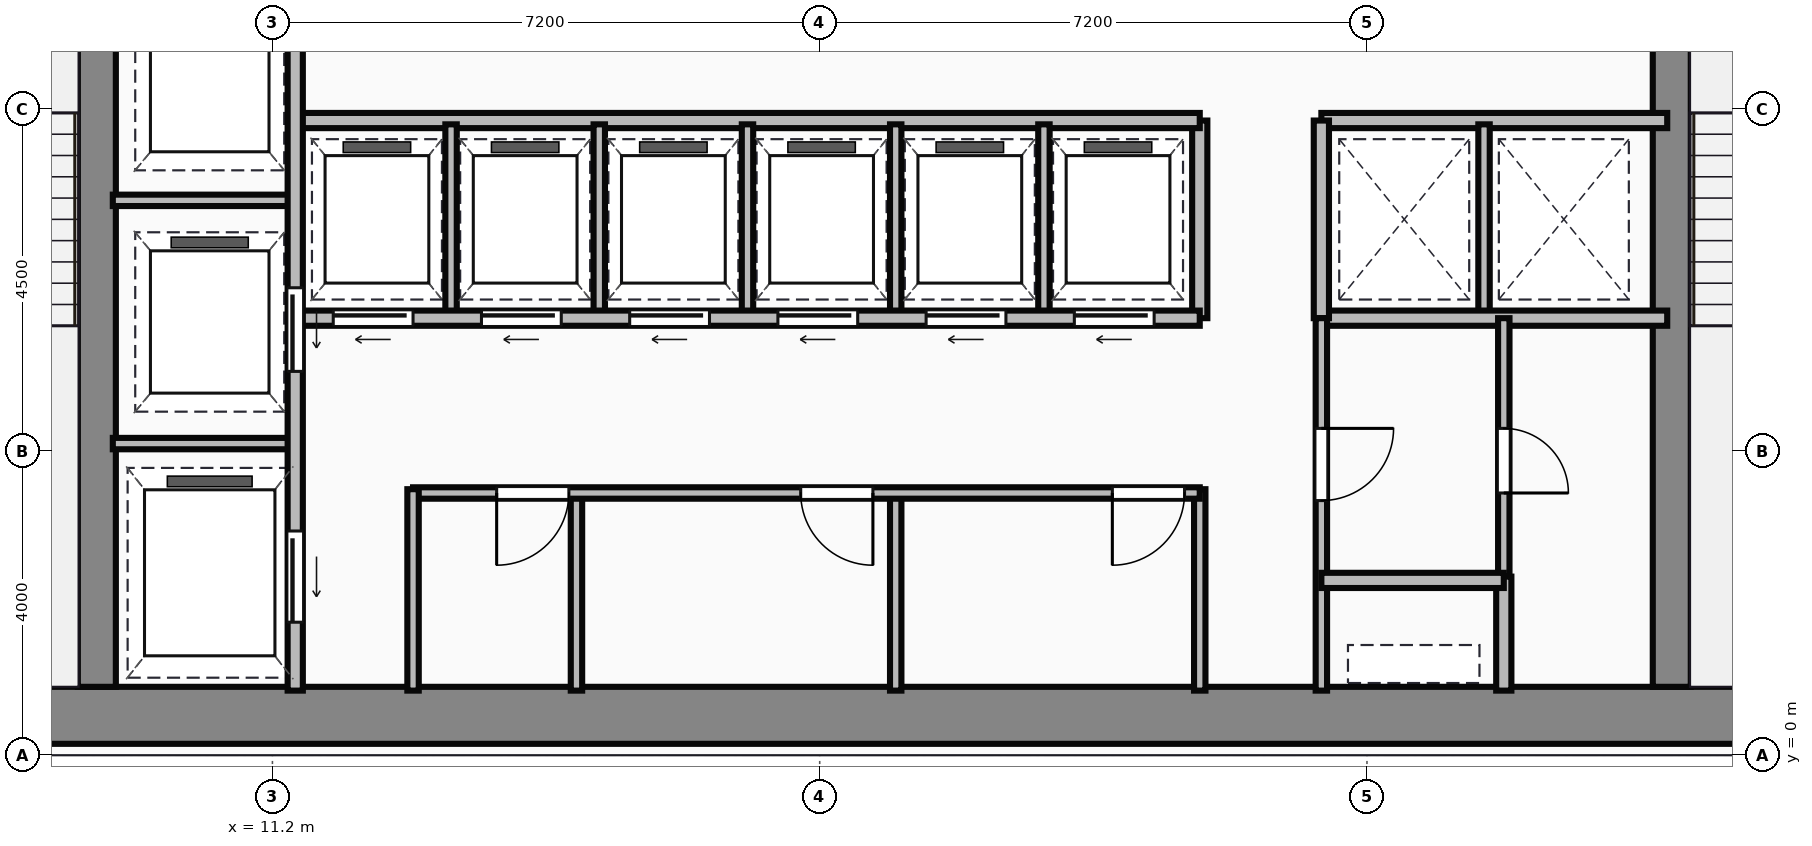
"""IFC4 building model, lengths in metres.
Left out: names, types, materials, properties, quantities, classifications, styles, units other than length and angle.
Written with IfcOpenShell. Run it as: python <this file> out.ifc"""

import sys

from ifc_helpers import new_model, si_unit, direction, frame, frame_2d, origin, place, context, subcontext, project, spatial, rectangle, extrude, source, transform, mapped, element, fill, save


model = new_model("IFC4")
c1 = context("Model", 3, precision=1e-05, world=origin(), true_north=direction((0.0, 1.0)))
c2 = subcontext(c1, "Body", "Model", "MODEL_VIEW")
j1 = project(units=[si_unit("LENGTHUNIT", "METRE"), si_unit("PLANEANGLEUNIT", "RADIAN")], contexts=[c1])
p1 = place(None, origin())
s1 = spatial("IfcSite", under=j1, at=p1, CompositionType="ELEMENT")
p2 = place(p1, origin())
s2 = spatial("IfcBuilding", under=s1, at=p2, CompositionType="ELEMENT")
p3 = place(p2, frame((0.0, 0.0, 114.2)))
s3 = spatial("IfcBuildingStorey", under=s2, at=p3, CompositionType="ELEMENT", Elevation=114.2)
m1 = source(origin(), c2, "Body", "SweptSolid", [
    extrude(rectangle(XDim=29.5, YDim=0.75, at=frame_2d((14.75, 0.0))), origin(), (0.0, 0.0, 1.0), 3.65),
])
p4 = place(p3, frame((4.5, 0.525, 0.0), z_axis=(0.0, 0.0, 1.0), x_axis=(1.0, 0.0, 0.0)))
e1 = element("IfcWall", 1, at=p4, inside=s3, PredefinedType="SHEAR", context=c2, shape_type="MappedRepresentation", body=[
    mapped(m1, transform((0.0, 0.0, 0.0))),
])
m2 = source(origin(), c2, "Body", "SweptSolid", [
    extrude(rectangle(XDim=12.35, YDim=0.5, at=frame_2d((6.175, 0.0))), origin(), (0.0, 0.0, 1.0), 3.65),
])
for number, where, z_axis, x_axis in (
    (2, (8.89, 0.9, 0.0), (0.0, 0.0, 1.0), (0.0, 1.0, 0.0)),
    (3, (29.61, 0.9, 0.0), (0.0, 0.0, 1.0), (0.0, 1.0, 0.0)),
):
    element("IfcWall", number, at=place(p3, frame(where, z_axis=z_axis, x_axis=x_axis)), inside=s3, PredefinedType="SHEAR", context=c2, shape_type="MappedRepresentation", body=[
        mapped(m2, transform((0.0, 0.0, 0.0))),
    ])
m3 = source(origin(), c2, "Body", "SweptSolid", [
    extrude(rectangle(XDim=9.6, YDim=0.2, at=frame_2d((4.8, 0.0))), origin(), (0.0, 0.0, 1.0), 3.4),
])
p5 = place(p3, frame((11.5, 0.85, 0.0), z_axis=(0.0, 0.0, 1.0), x_axis=(0.0, 1.0, 0.0)))
e4 = element("IfcWall", 4, at=p5, inside=s3, PredefinedType="PARTITIONING", context=c2, shape_type="MappedRepresentation", body=[
    mapped(m3, transform((0.0, 0.0, 0.0))),
])
p6 = place(p5, frame((4.2, 0.0, 0.0)))
e5 = element("IfcOpeningElement", 5, at=p6, cuts=e4, PredefinedType="OPENING", context=c2, shape_type="SweptSolid", body=[
    extrude(rectangle(XDim=1.1, YDim=2.15, at=frame_2d((0.55, 1.075))), frame((0.0, 0.11, 0.0), z_axis=(0.0, -1.0, 0.0), x_axis=(1.0, 0.0, 0.0)), (0.0, 0.0, 1.0), 0.22),
])
p7 = place(p5, frame((0.9, 0.0, 0.0)))
e6 = element("IfcOpeningElement", 6, at=p7, cuts=e4, PredefinedType="OPENING", context=c2, shape_type="SweptSolid", body=[
    extrude(rectangle(XDim=1.2, YDim=2.15, at=frame_2d((0.6, 1.075))), frame((0.0, 0.11, 0.0), z_axis=(0.0, -1.0, 0.0), x_axis=(1.0, 0.0, 0.0)), (0.0, 0.0, 1.0), 0.22),
])
m4 = source(origin(), c2, "Body", "SweptSolid", [
    extrude(rectangle(XDim=2.4, YDim=0.15, at=frame_2d((1.2, 0.0))), origin(), (0.0, 0.0, 1.0), 3.4),
])
for number, where, z_axis, x_axis in (
    (7, (9.1, 4.1, 0.0), (0.0, 0.0, 1.0), (1.0, 0.0, 0.0)),
    (8, (9.1, 7.3, 0.0), (0.0, 0.0, 1.0), (1.0, 0.0, 0.0)),
):
    element("IfcWall", number, at=place(p3, frame(where, z_axis=z_axis, x_axis=x_axis)), inside=s3, PredefinedType="PARTITIONING", context=c2, shape_type="MappedRepresentation", body=[
        mapped(m4, transform((0.0, 0.0, 0.0))),
    ])
m5 = source(origin(), c2, "Body", "SweptSolid", [
    extrude(rectangle(XDim=2.65, YDim=0.15, at=frame_2d((1.325, 0.0))), origin(), (0.0, 0.0, 1.0), 3.4),
])
p8 = place(p3, frame((13.05, 0.85, 0.0), z_axis=(0.0, 0.0, 1.0), x_axis=(0.0, 1.0, 0.0)))
e9 = element("IfcWall", 9, at=p8, inside=s3, PredefinedType="PARTITIONING", context=c2, shape_type="MappedRepresentation", body=[
    mapped(m5, transform((0.0, 0.0, 0.0))),
])
m6 = source(origin(), c2, "Body", "SweptSolid", [
    extrude(rectangle(XDim=10.35, YDim=0.15, at=frame_2d((5.175, 0.0))), origin(), (0.0, 0.0, 1.0), 3.4),
])
p9 = place(p3, frame((13.05, 3.45, 0.0), z_axis=(0.0, 0.0, 1.0), x_axis=(1.0, 0.0, 0.0)))
e10 = element("IfcWall", 10, at=p9, inside=s3, PredefinedType="PARTITIONING", context=c2, shape_type="MappedRepresentation", body=[
    mapped(m6, transform((0.0, 0.0, 0.0))),
])
p10 = place(p9, frame((1.1, 0.0, 0.0)))
e11 = element("IfcOpeningElement", 11, at=p10, cuts=e10, PredefinedType="OPENING", context=c2, shape_type="SweptSolid", body=[
    extrude(rectangle(XDim=0.95, YDim=2.15, at=frame_2d((0.475, 1.075))), frame((0.0, 0.085, 0.0), z_axis=(0.0, -1.0, 0.0), x_axis=(1.0, 0.0, 0.0)), (0.0, 0.0, 1.0), 0.17),
])
p11 = place(p9, frame((5.1, 0.0, 0.0)))
e12 = element("IfcOpeningElement", 12, at=p11, cuts=e10, PredefinedType="OPENING", context=c2, shape_type="SweptSolid", body=[
    extrude(rectangle(XDim=0.95, YDim=2.15, at=frame_2d((0.475, 1.075))), frame((0.0, 0.085, 0.0), z_axis=(0.0, -1.0, 0.0), x_axis=(1.0, 0.0, 0.0)), (0.0, 0.0, 1.0), 0.17),
])
p12 = place(p9, frame((9.2, 0.0, 0.0)))
e13 = element("IfcOpeningElement", 13, at=p12, cuts=e10, PredefinedType="OPENING", context=c2, shape_type="SweptSolid", body=[
    extrude(rectangle(XDim=0.95, YDim=2.15, at=frame_2d((0.475, 1.075))), frame((0.0, 0.085, 0.0), z_axis=(0.0, -1.0, 0.0), x_axis=(1.0, 0.0, 0.0)), (0.0, 0.0, 1.0), 0.17),
])
p13 = place(p3, frame((23.4, 0.85, 0.0), z_axis=(0.0, 0.0, 1.0), x_axis=(0.0, 1.0, 0.0)))
e14 = element("IfcWall", 14, at=p13, inside=s3, PredefinedType="PARTITIONING", context=c2, shape_type="MappedRepresentation", body=[
    mapped(m5, transform((0.0, 0.0, 0.0))),
])
m7 = source(origin(), c2, "Body", "SweptSolid", [
    extrude(rectangle(XDim=2.6, YDim=0.15, at=frame_2d((1.3, 0.0))), origin(), (0.0, 0.0, 1.0), 3.4),
])
for number, where, z_axis, x_axis in (
    (15, (15.2, 0.85, 0.0), (0.0, 0.0, 1.0), (0.0, 1.0, 0.0)),
    (16, (19.4, 0.85, 0.0), (0.0, 0.0, 1.0), (0.0, 1.0, 0.0)),
):
    element("IfcWall", number, at=place(p3, frame(where, z_axis=z_axis, x_axis=x_axis)), inside=s3, PredefinedType="PARTITIONING", context=c2, shape_type="MappedRepresentation", body=[
        mapped(m7, transform((0.0, 0.0, 0.0))),
    ])
m8 = source(origin(), c2, "Body", "SweptSolid", [
    extrude(rectangle(XDim=11.85, YDim=0.2, at=frame_2d((5.925, 0.0))), origin(), (0.0, 0.0, 1.0), 3.4),
])
p14 = place(p3, frame((11.55, 5.75, 0.0), z_axis=(0.0, 0.0, 1.0), x_axis=(1.0, 0.0, 0.0)))
e17 = element("IfcWall", 17, at=p14, inside=s3, PredefinedType="PARTITIONING", context=c2, shape_type="MappedRepresentation", body=[
    mapped(m8, transform((0.0, 0.0, 0.0))),
])
p15 = place(p14, frame((0.45, 0.0, 0.0)))
e18 = element("IfcOpeningElement", 18, at=p15, cuts=e17, PredefinedType="OPENING", context=c2, shape_type="SweptSolid", body=[
    extrude(rectangle(XDim=1.05, YDim=2.15, at=frame_2d((0.525, 1.075))), frame((0.0, 0.11, 0.0), z_axis=(0.0, -1.0, 0.0), x_axis=(1.0, 0.0, 0.0)), (0.0, 0.0, 1.0), 0.22),
])
p16 = place(p14, frame((2.4, 0.0, 0.0)))
e19 = element("IfcOpeningElement", 19, at=p16, cuts=e17, PredefinedType="OPENING", context=c2, shape_type="SweptSolid", body=[
    extrude(rectangle(XDim=1.05, YDim=2.15, at=frame_2d((0.525, 1.075))), frame((0.0, 0.11, 0.0), z_axis=(0.0, -1.0, 0.0), x_axis=(1.0, 0.0, 0.0)), (0.0, 0.0, 1.0), 0.22),
])
p17 = place(p14, frame((4.35, 0.0, 0.0)))
e20 = element("IfcOpeningElement", 20, at=p17, cuts=e17, PredefinedType="OPENING", context=c2, shape_type="SweptSolid", body=[
    extrude(rectangle(XDim=1.05, YDim=2.15, at=frame_2d((0.525, 1.075))), frame((0.0, 0.11, 0.0), z_axis=(0.0, -1.0, 0.0), x_axis=(1.0, 0.0, 0.0)), (0.0, 0.0, 1.0), 0.22),
])
p18 = place(p14, frame((6.3, 0.0, 0.0)))
e21 = element("IfcOpeningElement", 21, at=p18, cuts=e17, PredefinedType="OPENING", context=c2, shape_type="SweptSolid", body=[
    extrude(rectangle(XDim=1.05, YDim=2.15, at=frame_2d((0.525, 1.075))), frame((0.0, 0.11, 0.0), z_axis=(0.0, -1.0, 0.0), x_axis=(1.0, 0.0, 0.0)), (0.0, 0.0, 1.0), 0.22),
])
p19 = place(p14, frame((8.25, 0.0, 0.0)))
e22 = element("IfcOpeningElement", 22, at=p19, cuts=e17, PredefinedType="OPENING", context=c2, shape_type="SweptSolid", body=[
    extrude(rectangle(XDim=1.05, YDim=2.15, at=frame_2d((0.525, 1.075))), frame((0.0, 0.11, 0.0), z_axis=(0.0, -1.0, 0.0), x_axis=(1.0, 0.0, 0.0)), (0.0, 0.0, 1.0), 0.22),
])
p20 = place(p14, frame((10.2, 0.0, 0.0)))
e23 = element("IfcOpeningElement", 23, at=p20, cuts=e17, PredefinedType="OPENING", context=c2, shape_type="SweptSolid", body=[
    extrude(rectangle(XDim=1.05, YDim=2.15, at=frame_2d((0.525, 1.075))), frame((0.0, 0.11, 0.0), z_axis=(0.0, -1.0, 0.0), x_axis=(1.0, 0.0, 0.0)), (0.0, 0.0, 1.0), 0.22),
])
p21 = place(p3, frame((11.55, 8.35, 0.0), z_axis=(0.0, 0.0, 1.0), x_axis=(1.0, 0.0, 0.0)))
e24 = element("IfcWall", 24, at=p21, inside=s3, PredefinedType="PARTITIONING", context=c2, shape_type="MappedRepresentation", body=[
    mapped(m8, transform((0.0, 0.0, 0.0))),
])
m9 = source(origin(), c2, "Body", "SweptSolid", [
    extrude(rectangle(XDim=2.6, YDim=0.2, at=frame_2d((1.3, 0.0))), origin(), (0.0, 0.0, 1.0), 3.4),
])
p22 = place(p3, frame((23.4, 5.75, 0.0), z_axis=(0.0, 0.0, 1.0), x_axis=(0.0, 1.0, 0.0)))
e25 = element("IfcWall", 25, at=p22, inside=s3, PredefinedType="PARTITIONING", context=c2, shape_type="MappedRepresentation", body=[
    mapped(m9, transform((0.0, 0.0, 0.0))),
])
m10 = source(origin(), c2, "Body", "SweptSolid", [
    extrude(rectangle(XDim=2.5, YDim=0.15, at=frame_2d((1.25, 0.0))), origin(), (0.0, 0.0, 1.0), 3.4),
])
for number, where, z_axis, x_axis in (
    (26, (13.55, 5.8, 0.0), (0.0, 0.0, 1.0), (0.0, 1.0, 0.0)),
    (27, (15.5, 5.8, 0.0), (0.0, 0.0, 1.0), (0.0, 1.0, 0.0)),
    (28, (17.45, 5.8, 0.0), (0.0, 0.0, 1.0), (0.0, 1.0, 0.0)),
    (29, (19.4, 5.8, 0.0), (0.0, 0.0, 1.0), (0.0, 1.0, 0.0)),
    (30, (21.35, 5.8, 0.0), (0.0, 0.0, 1.0), (0.0, 1.0, 0.0)),
):
    element("IfcWall", number, at=place(p3, frame(where, z_axis=z_axis, x_axis=x_axis)), inside=s3, PredefinedType="PARTITIONING", context=c2, shape_type="MappedRepresentation", body=[
        mapped(m10, transform((0.0, 0.0, 0.0))),
    ])
m11 = source(origin(), c2, "Body", "SweptSolid", [
    extrude(rectangle(XDim=4.55, YDim=0.2, at=frame_2d((2.275, 0.0))), origin(), (0.0, 0.0, 1.0), 3.4),
])
for number, where, z_axis, x_axis in (
    (31, (25.0, 8.35, 0.0), (0.0, 0.0, 1.0), (1.0, 0.0, 0.0)),
    (32, (25.0, 5.75, 0.0), (0.0, 0.0, 1.0), (1.0, 0.0, 0.0)),
):
    element("IfcWall", number, at=place(p3, frame(where, z_axis=z_axis, x_axis=x_axis)), inside=s3, PredefinedType="PARTITIONING", context=c2, shape_type="MappedRepresentation", body=[
        mapped(m11, transform((0.0, 0.0, 0.0))),
    ])
p23 = place(p3, frame((25.0, 5.75, 0.0), z_axis=(0.0, 0.0, 1.0), x_axis=(0.0, 1.0, 0.0)))
e33 = element("IfcWall", 33, at=p23, inside=s3, PredefinedType="PARTITIONING", context=c2, shape_type="MappedRepresentation", body=[
    mapped(m9, transform((0.0, 0.0, 0.0))),
])
p24 = place(p3, frame((27.14, 5.8, 0.0), z_axis=(0.0, 0.0, 1.0), x_axis=(0.0, 1.0, 0.0)))
e34 = element("IfcWall", 34, at=p24, inside=s3, PredefinedType="PARTITIONING", context=c2, shape_type="MappedRepresentation", body=[
    mapped(m10, transform((0.0, 0.0, 0.0))),
])
m12 = source(origin(), c2, "Body", "SweptSolid", [
    extrude(rectangle(XDim=4.9, YDim=0.15, at=frame_2d((2.45, 0.0))), origin(), (0.0, 0.0, 1.0), 3.4),
])
p25 = place(p3, frame((25.0, 0.85, 0.0), z_axis=(0.0, 0.0, 1.0), x_axis=(0.0, 1.0, 0.0)))
e35 = element("IfcWall", 35, at=p25, inside=s3, PredefinedType="PARTITIONING", context=c2, shape_type="MappedRepresentation", body=[
    mapped(m12, transform((0.0, 0.0, 0.0))),
])
p26 = place(p25, frame((2.5, 0.0, 0.0)))
e36 = element("IfcOpeningElement", 36, at=p26, cuts=e35, PredefinedType="OPENING", context=c2, shape_type="SweptSolid", body=[
    extrude(rectangle(XDim=0.95, YDim=2.15, at=frame_2d((0.475, 1.075))), frame((0.0, 0.085, 0.0), z_axis=(0.0, -1.0, 0.0), x_axis=(1.0, 0.0, 0.0)), (0.0, 0.0, 1.0), 0.17),
])
m13 = source(origin(), c2, "Body", "SweptSolid", [
    extrude(rectangle(XDim=2.4, YDim=0.2, at=frame_2d((1.2, 0.0))), origin(), (0.0, 0.0, 1.0), 3.4),
])
p27 = place(p3, frame((25.0, 2.3, 0.0), z_axis=(0.0, 0.0, 1.0), x_axis=(1.0, 0.0, 0.0)))
e37 = element("IfcWall", 37, at=p27, inside=s3, PredefinedType="PARTITIONING", context=c2, shape_type="MappedRepresentation", body=[
    mapped(m13, transform((0.0, 0.0, 0.0))),
])
m14 = source(origin(), c2, "Body", "SweptSolid", [
    extrude(rectangle(XDim=1.5, YDim=0.2, at=frame_2d((0.75, 0.0))), origin(), (0.0, 0.0, 1.0), 3.4),
])
p28 = place(p3, frame((27.4, 0.85, 0.0), z_axis=(0.0, 0.0, 1.0), x_axis=(0.0, 1.0, 0.0)))
e38 = element("IfcWall", 38, at=p28, inside=s3, PredefinedType="PARTITIONING", context=c2, shape_type="MappedRepresentation", body=[
    mapped(m14, transform((0.0, 0.0, 0.0))),
])
m15 = source(origin(), c2, "Body", "SweptSolid", [
    extrude(rectangle(XDim=3.4, YDim=0.15, at=frame_2d((1.7, 0.0))), origin(), (0.0, 0.0, 1.0), 3.4),
])
p29 = place(p3, frame((27.4, 2.35, 0.0), z_axis=(0.0, 0.0, 1.0), x_axis=(0.0, 1.0, 0.0)))
e39 = element("IfcWall", 39, at=p29, inside=s3, PredefinedType="PARTITIONING", context=c2, shape_type="MappedRepresentation", body=[
    mapped(m15, transform((0.0, 0.0, 0.0))),
])
p30 = place(p29, frame((1.1, 0.0, 0.0)))
e40 = element("IfcOpeningElement", 40, at=p30, cuts=e39, PredefinedType="OPENING", context=c2, shape_type="SweptSolid", body=[
    extrude(rectangle(XDim=0.85, YDim=2.1, at=frame_2d((0.425, 1.05))), frame((0.0, 0.085, 0.0), z_axis=(0.0, -1.0, 0.0), x_axis=(1.0, 0.0, 0.0)), (0.0, 0.0, 1.0), 0.17),
])
m16 = source(origin(), c2, "Body", "SweptSolid", [
    extrude(rectangle(XDim=1.1, YDim=2.15, at=frame_2d((0.55, 1.075))), frame((0.0, 0.025, 0.0), z_axis=(0.0, -1.0, 0.0), x_axis=(1.0, 0.0, 0.0)), (0.0, 0.0, 1.0), 0.05),
])
p31 = place(p6, frame((1.1, 0.0, 0.0), z_axis=(0.0, 0.0, 1.0), x_axis=(-1.0, 0.0, 0.0)))
e41 = element("IfcDoor", 41, at=p31, inside=s3, OperationType="SLIDING_TO_LEFT", PredefinedType="DOOR", context=c2, shape_type="MappedRepresentation", body=[
    mapped(m16, transform((0.0, 0.0, 0.0))),
])
fill(e5, e41)
m17 = source(origin(), c2, "Body", "SweptSolid", [
    extrude(rectangle(XDim=1.2, YDim=2.15, at=frame_2d((0.6, 1.075))), frame((0.0, 0.025, 0.0), z_axis=(0.0, -1.0, 0.0), x_axis=(1.0, 0.0, 0.0)), (0.0, 0.0, 1.0), 0.05),
])
p32 = place(p7, frame((1.2, 0.0, 0.0), z_axis=(0.0, 0.0, 1.0), x_axis=(-1.0, 0.0, 0.0)))
e42 = element("IfcDoor", 42, at=p32, inside=s3, OperationType="SLIDING_TO_LEFT", PredefinedType="DOOR", context=c2, shape_type="MappedRepresentation", body=[
    mapped(m17, transform((0.0, 0.0, 0.0))),
])
fill(e6, e42)
m18 = source(origin(), c2, "Body", "SweptSolid", [
    extrude(rectangle(XDim=0.95, YDim=2.15, at=frame_2d((0.475, 1.075))), frame((0.0, 0.025, 0.0), z_axis=(0.0, -1.0, 0.0), x_axis=(1.0, 0.0, 0.0)), (0.0, 0.0, 1.0), 0.05),
])
p33 = place(p10, origin())
e43 = element("IfcDoor", 43, at=p33, inside=s3, OperationType="SINGLE_SWING_LEFT", PredefinedType="DOOR", context=c2, shape_type="MappedRepresentation", body=[
    mapped(m18, transform((0.0, 0.0, 0.0))),
])
fill(e11, e43)
p34 = place(p11, origin())
e44 = element("IfcDoor", 44, at=p34, inside=s3, OperationType="SINGLE_SWING_RIGHT", PredefinedType="DOOR", context=c2, shape_type="MappedRepresentation", body=[
    mapped(m18, transform((0.0, 0.0, 0.0))),
])
fill(e12, e44)
p35 = place(p12, origin())
e45 = element("IfcDoor", 45, at=p35, inside=s3, OperationType="SINGLE_SWING_LEFT", PredefinedType="DOOR", context=c2, shape_type="MappedRepresentation", body=[
    mapped(m18, transform((0.0, 0.0, 0.0))),
])
fill(e13, e45)
m19 = source(origin(), c2, "Body", "SweptSolid", [
    extrude(rectangle(XDim=1.05, YDim=2.15, at=frame_2d((0.525, 1.075))), frame((0.0, 0.025, 0.0), z_axis=(0.0, -1.0, 0.0), x_axis=(1.0, 0.0, 0.0)), (0.0, 0.0, 1.0), 0.05),
])
p36 = place(p15, frame((1.05, 0.0, 0.0), z_axis=(0.0, 0.0, 1.0), x_axis=(-1.0, 0.0, 0.0)))
e46 = element("IfcDoor", 46, at=p36, inside=s3, OperationType="SLIDING_TO_LEFT", PredefinedType="DOOR", context=c2, shape_type="MappedRepresentation", body=[
    mapped(m19, transform((0.0, 0.0, 0.0))),
])
fill(e18, e46)
p37 = place(p16, frame((1.05, 0.0, 0.0), z_axis=(0.0, 0.0, 1.0), x_axis=(-1.0, 0.0, 0.0)))
e47 = element("IfcDoor", 47, at=p37, inside=s3, OperationType="SLIDING_TO_LEFT", PredefinedType="DOOR", context=c2, shape_type="MappedRepresentation", body=[
    mapped(m19, transform((0.0, 0.0, 0.0))),
])
fill(e19, e47)
p38 = place(p17, frame((1.05, 0.0, 0.0), z_axis=(0.0, 0.0, 1.0), x_axis=(-1.0, 0.0, 0.0)))
e48 = element("IfcDoor", 48, at=p38, inside=s3, OperationType="SLIDING_TO_LEFT", PredefinedType="DOOR", context=c2, shape_type="MappedRepresentation", body=[
    mapped(m19, transform((0.0, 0.0, 0.0))),
])
fill(e20, e48)
p39 = place(p18, frame((1.05, 0.0, 0.0), z_axis=(0.0, 0.0, 1.0), x_axis=(-1.0, 0.0, 0.0)))
e49 = element("IfcDoor", 49, at=p39, inside=s3, OperationType="SLIDING_TO_LEFT", PredefinedType="DOOR", context=c2, shape_type="MappedRepresentation", body=[
    mapped(m19, transform((0.0, 0.0, 0.0))),
])
fill(e21, e49)
p40 = place(p19, frame((1.05, 0.0, 0.0), z_axis=(0.0, 0.0, 1.0), x_axis=(-1.0, 0.0, 0.0)))
e50 = element("IfcDoor", 50, at=p40, inside=s3, OperationType="SLIDING_TO_LEFT", PredefinedType="DOOR", context=c2, shape_type="MappedRepresentation", body=[
    mapped(m19, transform((0.0, 0.0, 0.0))),
])
fill(e22, e50)
p41 = place(p20, frame((1.05, 0.0, 0.0), z_axis=(0.0, 0.0, 1.0), x_axis=(-1.0, 0.0, 0.0)))
e51 = element("IfcDoor", 51, at=p41, inside=s3, OperationType="SLIDING_TO_LEFT", PredefinedType="DOOR", context=c2, shape_type="MappedRepresentation", body=[
    mapped(m19, transform((0.0, 0.0, 0.0))),
])
fill(e23, e51)
p42 = place(p26, origin())
e52 = element("IfcDoor", 52, at=p42, inside=s3, OperationType="SINGLE_SWING_RIGHT", PredefinedType="DOOR", context=c2, shape_type="MappedRepresentation", body=[
    mapped(m18, transform((0.0, 0.0, 0.0))),
])
fill(e36, e52)
m20 = source(origin(), c2, "Body", "SweptSolid", [
    extrude(rectangle(XDim=0.85, YDim=2.1, at=frame_2d((0.425, 1.05))), frame((0.0, 0.025, 0.0), z_axis=(0.0, -1.0, 0.0), x_axis=(1.0, 0.0, 0.0)), (0.0, 0.0, 1.0), 0.05),
])
p43 = place(p30, frame((0.85, 0.0, 0.0), z_axis=(0.0, 0.0, 1.0), x_axis=(-1.0, 0.0, 0.0)))
e53 = element("IfcDoor", 53, at=p43, inside=s3, OperationType="SINGLE_SWING_LEFT", PredefinedType="DOOR", context=c2, shape_type="MappedRepresentation", body=[
    mapped(m20, transform((0.0, 0.0, 0.0))),
])
fill(e40, e53)
save(model, sys.argv[1])
